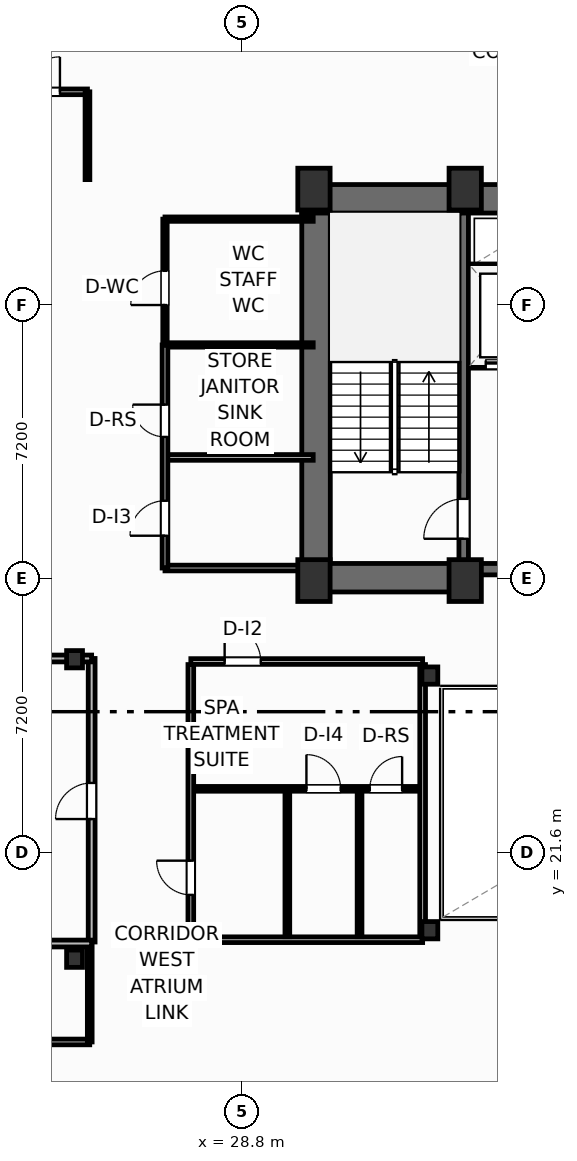
"""IFC4 building model, lengths in metres.
Left out: names, types, materials, properties, quantities, classifications, styles, units other than length and angle.
Written with IfcOpenShell. Run it as: python <this file> out.ifc"""

import sys

from ifc_helpers import new_model, si_unit, direction, frame, frame_2d, origin, origin_2d, place, context, subcontext, project, spatial, rectangle, i_section, extrude, element, fill, save


model = new_model("IFC4")
c1 = context("Model", 3, precision=1e-05, world=origin(), true_north=direction((0.0, 1.0)))
c2 = subcontext(c1, "Body", "Model", "MODEL_VIEW")
j1 = project(units=[si_unit("LENGTHUNIT", "METRE"), si_unit("PLANEANGLEUNIT", "RADIAN")], contexts=[c1])
p1 = place(None, origin())
s1 = spatial("IfcSite", under=j1, at=p1, CompositionType="ELEMENT")
p2 = place(p1, origin())
s2 = spatial("IfcBuilding", under=s1, at=p2, CompositionType="ELEMENT")
p3 = place(p2, frame((0.0, 0.0, 155.0)))
s3 = spatial("IfcBuildingStorey", under=s2, at=p3, CompositionType="ELEMENT", Elevation=155.0)
for number, where, z_axis, x_axis in (
    (1, (30.7, 28.75, 0.0), (0.0, 0.0, 1.0), (1.0, 0.0, 0.0)),
    (2, (34.68, 28.75, 0.0), (0.0, 0.0, 1.0), (1.0, 0.0, 0.0)),
    (3, (30.7, 39.05, 0.0), (0.0, 0.0, 1.0), (1.0, 0.0, 0.0)),
    (4, (34.68, 39.05, 0.0), (0.0, 0.0, 1.0), (1.0, 0.0, 0.0)),
):
    element("IfcColumn", number, at=place(p3, frame(where, z_axis=z_axis, x_axis=x_axis)), inside=s3, PredefinedType="COLUMN", context=c2, shape_type="SweptSolid", body=[
        extrude(rectangle(XDim=0.85, YDim=1.1, at=origin_2d()), origin(), (0.0, 0.0, 1.0), 3.7),
    ])
for number, where, z_axis, x_axis in (
    (5, (33.75, 19.55, 0.0), (0.0, 0.0, 1.0), (1.0, 0.0, 0.0)),
    (6, (33.75, 26.25, 0.0), (0.0, 0.0, 1.0), (1.0, 0.0, 0.0)),
    (7, (24.4, 18.8, 0.0), (0.0, 0.0, 1.0), (1.0, 0.0, 0.0)),
    (8, (24.4, 26.68, 0.0), (0.0, 0.0, 1.0), (1.0, 0.0, 0.0)),
):
    element("IfcColumn", number, at=place(p3, frame(where, z_axis=z_axis, x_axis=x_axis)), inside=s3, PredefinedType="COLUMN", context=c2, shape_type="SweptSolid", body=[
        extrude(i_section(OverallWidth=0.418, OverallDepth=0.455, WebThickness=0.042, FlangeThickness=0.068, FilletRadius=0.025, at=origin_2d()), origin(), (0.0, 0.0, 1.0), 3.7),
    ])
p4 = place(p3, frame((30.38, 38.795, 0.0), z_axis=(0.0, 0.0, 1.0), x_axis=(1.0, 0.0, 0.0)))
e9 = element("IfcWall", 9, at=p4, inside=s3, PredefinedType="SHEAR", context=c2, shape_type="SweptSolid", body=[
    extrude(rectangle(XDim=17.64, YDim=0.75, at=frame_2d((8.82, 0.0))), origin(), (0.0, 0.0, 1.0), 3.45),
])
p5 = place(p3, frame((30.755, 29.2, 0.0), z_axis=(0.0, 0.0, 1.0), x_axis=(0.0, 1.0, 0.0)))
e10 = element("IfcWall", 10, at=p5, inside=s3, PredefinedType="SHEAR", context=c2, shape_type="SweptSolid", body=[
    extrude(rectangle(XDim=9.22, YDim=0.75, at=frame_2d((4.61, 0.0))), origin(), (0.0, 0.0, 1.0), 3.45),
])
p6 = place(p3, frame((30.38, 28.825, 0.0), z_axis=(0.0, 0.0, 1.0), x_axis=(1.0, 0.0, 0.0)))
e11 = element("IfcWall", 11, at=p6, inside=s3, PredefinedType="SHEAR", context=c2, shape_type="SweptSolid", body=[
    extrude(rectangle(XDim=4.42, YDim=0.75, at=frame_2d((2.21, 0.0))), origin(), (0.0, 0.0, 1.0), 3.45),
])
p7 = place(p3, frame((34.8, 29.05, 0.0), z_axis=(0.0, 0.0, 1.0), x_axis=(1.0, 0.0, 0.0)))
e12 = element("IfcWall", 12, at=p7, inside=s3, PredefinedType="SHEAR", context=c2, shape_type="SweptSolid", body=[
    extrude(rectangle(XDim=8.8, YDim=0.3, at=frame_2d((4.4, 0.0))), origin(), (0.0, 0.0, 1.0), 3.45),
])
p8 = place(p7, frame((0.95, 0.0, 0.0)))
e13 = element("IfcOpeningElement", 13, at=p8, cuts=e12, PredefinedType="OPENING", context=c2, shape_type="SweptSolid", body=[
    extrude(rectangle(XDim=1.1, YDim=2.15, at=frame_2d((0.55, 1.075))), frame((0.0, 0.16, 0.0), z_axis=(0.0, -1.0, 0.0), x_axis=(1.0, 0.0, 0.0)), (0.0, 0.0, 1.0), 0.32),
])
p9 = place(p7, frame((6.75, 0.0, 0.0)))
e14 = element("IfcOpeningElement", 14, at=p9, cuts=e12, PredefinedType="OPENING", context=c2, shape_type="SweptSolid", body=[
    extrude(rectangle(XDim=1.1, YDim=2.15, at=frame_2d((0.55, 1.075))), frame((0.0, 0.16, 0.0), z_axis=(0.0, -1.0, 0.0), x_axis=(1.0, 0.0, 0.0)), (0.0, 0.0, 1.0), 0.32),
])
p10 = place(p7, frame((4.45, 0.0, 0.0)))
e15 = element("IfcOpeningElement", 15, at=p10, cuts=e12, PredefinedType="OPENING", context=c2, shape_type="SweptSolid", body=[
    extrude(rectangle(XDim=0.95, YDim=2.15, at=frame_2d((0.475, 1.075))), frame((0.0, 0.16, 0.0), z_axis=(0.0, -1.0, 0.0), x_axis=(1.0, 0.0, 0.0)), (0.0, 0.0, 1.0), 0.32),
])
p11 = place(p3, frame((34.64, 29.2, 0.0), z_axis=(0.0, 0.0, 1.0), x_axis=(0.0, 1.0, 0.0)))
e16 = element("IfcWall", 16, at=p11, inside=s3, PredefinedType="SHEAR", context=c2, shape_type="SweptSolid", body=[
    extrude(rectangle(XDim=9.22, YDim=0.25, at=frame_2d((4.61, 0.0))), origin(), (0.0, 0.0, 1.0), 3.45),
])
p12 = place(p11, frame((0.65, 0.0, 0.0)))
e17 = element("IfcOpeningElement", 17, at=p12, cuts=e16, PredefinedType="OPENING", context=c2, shape_type="SweptSolid", body=[
    extrude(rectangle(XDim=1.05, YDim=2.15, at=frame_2d((0.525, 1.075))), frame((0.0, 0.135, 0.0), z_axis=(0.0, -1.0, 0.0), x_axis=(1.0, 0.0, 0.0)), (0.0, 0.0, 1.0), 0.27),
])
p13 = place(p3, frame((5.0, 16.61, 0.0), z_axis=(0.0, 0.0, 1.0), x_axis=(1.0, 0.0, 0.0)))
e18 = element("IfcWall", 18, at=p13, inside=s3, PredefinedType="PARTITIONING", context=c2, shape_type="SweptSolid", body=[
    extrude(rectangle(XDim=19.8, YDim=0.15, at=frame_2d((9.9, 0.0))), origin(), (0.0, 0.0, 1.0), 3.45),
])
p14 = place(p13, frame((12.485, 0.0, 0.0)))
e19 = element("IfcOpeningElement", 19, at=p14, cuts=e18, PredefinedType="OPENING", context=c2, shape_type="SweptSolid", body=[
    extrude(rectangle(XDim=0.92, YDim=2.05, at=frame_2d((0.46, 1.025))), frame((0.0, 0.085, 0.0), z_axis=(0.0, -1.0, 0.0), x_axis=(1.0, 0.0, 0.0)), (0.0, 0.0, 1.0), 0.17),
])
p15 = place(p3, frame((24.8, 16.61, 0.0), z_axis=(0.0, 0.0, 1.0), x_axis=(0.0, 1.0, 0.0)))
e20 = element("IfcWall", 20, at=p15, inside=s3, PredefinedType="PARTITIONING", context=c2, shape_type="SweptSolid", body=[
    extrude(rectangle(XDim=2.63, YDim=0.125, at=frame_2d((1.315, 0.0))), origin(), (0.0, 0.0, 1.0), 2.662),
])
p16 = place(p3, frame((5.0, 41.61, 0.0), z_axis=(0.0, 0.0, 1.0), x_axis=(1.0, 0.0, 0.0)))
e21 = element("IfcWall", 21, at=p16, inside=s3, PredefinedType="PARTITIONING", context=c2, shape_type="SweptSolid", body=[
    extrude(rectangle(XDim=19.74, YDim=0.15, at=frame_2d((9.87, 0.0))), origin(), (0.0, 0.0, 1.0), 3.45),
])
p17 = place(p16, frame((18.096, 0.0, 0.0)))
e22 = element("IfcOpeningElement", 22, at=p17, cuts=e21, PredefinedType="OPENING", context=c2, shape_type="SweptSolid", body=[
    extrude(rectangle(XDim=0.92, YDim=2.05, at=frame_2d((0.46, 1.025))), frame((0.0, 0.085, 0.0), z_axis=(0.0, -1.0, 0.0), x_axis=(1.0, 0.0, 0.0)), (0.0, 0.0, 1.0), 0.17),
])
p18 = place(p3, frame((24.74, 39.3, 0.0), z_axis=(0.0, 0.0, 1.0), x_axis=(0.0, 1.0, 0.0)))
e23 = element("IfcWall", 23, at=p18, inside=s3, PredefinedType="PARTITIONING", context=c2, shape_type="SweptSolid", body=[
    extrude(rectangle(XDim=2.31, YDim=0.125, at=frame_2d((1.155, 0.0))), origin(), (0.0, 0.0, 1.0), 3.45),
])
p19 = place(p3, frame((24.85, 19.24, 0.0), z_axis=(0.0, 0.0, 1.0), x_axis=(0.0, 1.0, 0.0)))
e24 = element("IfcWall", 24, at=p19, inside=s3, PredefinedType="PARTITIONING", context=c2, shape_type="SweptSolid", body=[
    extrude(rectangle(XDim=7.46, YDim=0.18, at=frame_2d((3.73, 0.0))), origin(), (0.0, 0.0, 1.0), 3.45),
])
p20 = place(p19, frame((3.235, 0.0, 0.0)))
e25 = element("IfcOpeningElement", 25, at=p20, cuts=e24, PredefinedType="OPENING", context=c2, shape_type="SweptSolid", body=[
    extrude(rectangle(XDim=0.95, YDim=2.05, at=frame_2d((0.475, 1.025))), frame((0.0, 0.1, 0.0), z_axis=(0.0, -1.0, 0.0), x_axis=(1.0, 0.0, 0.0)), (0.0, 0.0, 1.0), 0.2),
])
p21 = place(p3, frame((1.169, 19.2, 0.0), z_axis=(0.0, 0.0, 1.0), x_axis=(1.0, 0.0, 0.0)))
e26 = element("IfcWall", 26, at=p21, inside=s3, PredefinedType="PARTITIONING", context=c2, shape_type="SweptSolid", body=[
    extrude(rectangle(XDim=23.681, YDim=0.18, at=frame_2d((11.84, 0.0))), origin(), (0.0, 0.0, 1.0), 3.45),
])
p22 = place(p3, frame((2.078, 26.7, 0.0), z_axis=(0.0, 0.0, 1.0), x_axis=(1.0, 0.0, 0.0)))
e27 = element("IfcWall", 27, at=p22, inside=s3, PredefinedType="PARTITIONING", context=c2, shape_type="SweptSolid", body=[
    extrude(rectangle(XDim=22.772, YDim=0.18, at=frame_2d((11.386, 0.0))), origin(), (0.0, 0.0, 1.0), 2.662),
])
p23 = place(p3, frame((34.8, 34.44, 0.0), z_axis=(0.0, 0.0, 1.0), x_axis=(1.0, 0.0, 0.0)))
e28 = element("IfcWall", 28, at=p23, inside=s3, PredefinedType="PARTITIONING", context=c2, shape_type="SweptSolid", body=[
    extrude(rectangle(XDim=2.18, YDim=0.2, at=frame_2d((1.09, 0.0))), origin(), (0.0, 0.0, 1.0), 3.45),
])
p24 = place(p23, frame((0.42, 0.0, 0.0)))
e29 = element("IfcOpeningElement", 29, at=p24, cuts=e28, PredefinedType="OPENING", context=c2, shape_type="SweptSolid", body=[
    extrude(rectangle(XDim=1.2, YDim=2.2, at=frame_2d((0.6, 1.1))), frame((0.0, 0.11, 0.0), z_axis=(0.0, -1.0, 0.0), x_axis=(1.0, 0.0, 0.0)), (0.0, 0.0, 1.0), 0.22),
])
p25 = place(p3, frame((34.8, 36.98, 0.0), z_axis=(0.0, 0.0, 1.0), x_axis=(1.0, 0.0, 0.0)))
e30 = element("IfcWall", 30, at=p25, inside=s3, PredefinedType="PARTITIONING", context=c2, shape_type="SweptSolid", body=[
    extrude(rectangle(XDim=2.18, YDim=0.2, at=frame_2d((1.09, 0.0))), origin(), (0.0, 0.0, 1.0), 3.45),
])
p26 = place(p3, frame((27.46, 26.62, 0.0), z_axis=(0.0, 0.0, 1.0), x_axis=(1.0, 0.0, 0.0)))
e31 = element("IfcWall", 31, at=p26, inside=s3, PredefinedType="PARTITIONING", context=c2, shape_type="SweptSolid", body=[
    extrude(rectangle(XDim=6.1, YDim=0.15, at=frame_2d((3.05, 0.0))), origin(), (0.0, 0.0, 1.0), 2.662),
])
p27 = place(p26, frame((0.89, 0.0, 0.0)))
e32 = element("IfcOpeningElement", 32, at=p27, cuts=e31, PredefinedType="OPENING", context=c2, shape_type="SweptSolid", body=[
    extrude(rectangle(XDim=0.95, YDim=2.05, at=frame_2d((0.475, 1.025))), frame((0.0, 0.085, 0.0), z_axis=(0.0, -1.0, 0.0), x_axis=(1.0, 0.0, 0.0)), (0.0, 0.0, 1.0), 0.17),
])
p28 = place(p3, frame((27.46, 19.3, 0.0), z_axis=(0.0, 0.0, 1.0), x_axis=(1.0, 0.0, 0.0)))
e33 = element("IfcWall", 33, at=p28, inside=s3, PredefinedType="PARTITIONING", context=c2, shape_type="SweptSolid", body=[
    extrude(rectangle(XDim=6.1, YDim=0.15, at=frame_2d((3.05, 0.0))), origin(), (0.0, 0.0, 1.0), 2.662),
])
p29 = place(p3, frame((27.52, 23.27, 0.0), z_axis=(0.0, 0.0, 1.0), x_axis=(1.0, 0.0, 0.0)))
e34 = element("IfcWall", 34, at=p29, inside=s3, PredefinedType="PARTITIONING", context=c2, shape_type="SweptSolid", body=[
    extrude(rectangle(XDim=6.0, YDim=0.125, at=frame_2d((3.0, 0.0))), origin(), (0.0, 0.0, 1.0), 3.45),
])
p30 = place(p29, frame((2.982, 0.0, 0.0)))
e35 = element("IfcOpeningElement", 35, at=p30, cuts=e34, PredefinedType="OPENING", context=c2, shape_type="SweptSolid", body=[
    extrude(rectangle(XDim=0.9, YDim=2.05, at=frame_2d((0.45, 1.025))), frame((0.0, 0.073, 0.0), z_axis=(0.0, -1.0, 0.0), x_axis=(1.0, 0.0, 0.0)), (0.0, 0.0, 1.0), 0.145),
])
p31 = place(p29, frame((4.65, 0.0, 0.0)))
e36 = element("IfcOpeningElement", 36, at=p31, cuts=e34, PredefinedType="OPENING", context=c2, shape_type="SweptSolid", body=[
    extrude(rectangle(XDim=0.85, YDim=2.05, at=frame_2d((0.425, 1.025))), frame((0.0, 0.073, 0.0), z_axis=(0.0, -1.0, 0.0), x_axis=(1.0, 0.0, 0.0)), (0.0, 0.0, 1.0), 0.145),
])
for number, where, z_axis, x_axis in (
    (37, (30.0, 19.38, 0.0), (0.0, 0.0, 1.0), (0.0, 1.0, 0.0)),
    (38, (31.9, 19.38, 0.0), (0.0, 0.0, 1.0), (0.0, 1.0, 0.0)),
):
    element("IfcWall", number, at=place(p3, frame(where, z_axis=z_axis, x_axis=x_axis)), inside=s3, PredefinedType="PARTITIONING", context=c2, shape_type="SweptSolid", body=[
        extrude(rectangle(XDim=3.82, YDim=0.125, at=frame_2d((1.91, 0.0))), origin(), (0.0, 0.0, 1.0), 3.45),
    ])
p32 = place(p3, frame((27.46, 19.38, 0.0), z_axis=(0.0, 0.0, 1.0), x_axis=(0.0, 1.0, 0.0)))
e39 = element("IfcWall", 39, at=p32, inside=s3, PredefinedType="PARTITIONING", context=c2, shape_type="SweptSolid", body=[
    extrude(rectangle(XDim=7.16, YDim=0.15, at=frame_2d((3.58, 0.0))), origin(), (0.0, 0.0, 1.0), 3.45),
])
p33 = place(p32, frame((1.1, 0.0, 0.0)))
e40 = element("IfcOpeningElement", 40, at=p33, cuts=e39, PredefinedType="OPENING", context=c2, shape_type="SweptSolid", body=[
    extrude(rectangle(XDim=0.9, YDim=2.05, at=frame_2d((0.45, 1.025))), frame((0.0, 0.085, 0.0), z_axis=(0.0, -1.0, 0.0), x_axis=(1.0, 0.0, 0.0)), (0.0, 0.0, 1.0), 0.17),
])
p34 = place(p3, frame((33.56, 19.38, 0.0), z_axis=(0.0, 0.0, 1.0), x_axis=(0.0, 1.0, 0.0)))
e41 = element("IfcWall", 41, at=p34, inside=s3, PredefinedType="PARTITIONING", context=c2, shape_type="SweptSolid", body=[
    extrude(rectangle(XDim=7.16, YDim=0.15, at=frame_2d((3.58, 0.0))), origin(), (0.0, 0.0, 1.0), 2.824),
])
p35 = place(p3, frame((26.78, 29.08, 0.0), z_axis=(0.0, 0.0, 1.0), x_axis=(1.0, 0.0, 0.0)))
e42 = element("IfcWall", 42, at=p35, inside=s3, PredefinedType="PARTITIONING", context=c2, shape_type="SweptSolid", body=[
    extrude(rectangle(XDim=3.6, YDim=0.15, at=frame_2d((1.8, 0.0))), origin(), (0.0, 0.0, 1.0), 3.45),
])
p36 = place(p3, frame((26.8, 31.99, 0.0), z_axis=(0.0, 0.0, 1.0), x_axis=(1.0, 0.0, 0.0)))
e43 = element("IfcWall", 43, at=p36, inside=s3, PredefinedType="PARTITIONING", context=c2, shape_type="SweptSolid", body=[
    extrude(rectangle(XDim=3.88, YDim=0.15, at=frame_2d((1.94, 0.0))), origin(), (0.0, 0.0, 1.0), 3.45),
])
p37 = place(p3, frame((26.8, 34.95, 0.0), z_axis=(0.0, 0.0, 1.0), x_axis=(1.0, 0.0, 0.0)))
e44 = element("IfcWall", 44, at=p37, inside=s3, PredefinedType="PARTITIONING", context=c2, shape_type="SweptSolid", body=[
    extrude(rectangle(XDim=3.88, YDim=0.115, at=frame_2d((1.94, 0.0))), origin(), (0.0, 0.0, 1.0), 3.45),
])
p38 = place(p3, frame((26.78, 38.26, 0.0), z_axis=(0.0, 0.0, 1.0), x_axis=(1.0, 0.0, 0.0)))
e45 = element("IfcWall", 45, at=p38, inside=s3, PredefinedType="PARTITIONING", context=c2, shape_type="SweptSolid", body=[
    extrude(rectangle(XDim=3.9, YDim=0.115, at=frame_2d((1.95, 0.0))), origin(), (0.0, 0.0, 1.0), 3.45),
])
p39 = place(p3, frame((26.78, 29.08, 0.0), z_axis=(0.0, 0.0, 1.0), x_axis=(0.0, 1.0, 0.0)))
e46 = element("IfcWall", 46, at=p39, inside=s3, PredefinedType="PARTITIONING", context=c2, shape_type="SweptSolid", body=[
    extrude(rectangle(XDim=5.87, YDim=0.15, at=frame_2d((2.935, 0.0))), origin(), (0.0, 0.0, 1.0), 3.45),
])
p40 = place(p39, frame((0.85, 0.0, 0.0)))
e47 = element("IfcOpeningElement", 47, at=p40, cuts=e46, PredefinedType="OPENING", context=c2, shape_type="SweptSolid", body=[
    extrude(rectangle(XDim=0.92, YDim=2.05, at=frame_2d((0.46, 1.025))), frame((0.0, 0.085, 0.0), z_axis=(0.0, -1.0, 0.0), x_axis=(1.0, 0.0, 0.0)), (0.0, 0.0, 1.0), 0.17),
])
p41 = place(p39, frame((3.45, 0.0, 0.0)))
e48 = element("IfcOpeningElement", 48, at=p41, cuts=e46, PredefinedType="OPENING", context=c2, shape_type="SweptSolid", body=[
    extrude(rectangle(XDim=0.85, YDim=2.05, at=frame_2d((0.425, 1.025))), frame((0.0, 0.085, 0.0), z_axis=(0.0, -1.0, 0.0), x_axis=(1.0, 0.0, 0.0)), (0.0, 0.0, 1.0), 0.17),
])
p42 = place(p3, frame((26.78, 34.95, 0.0), z_axis=(0.0, 0.0, 1.0), x_axis=(0.0, 1.0, 0.0)))
e49 = element("IfcWall", 49, at=p42, inside=s3, PredefinedType="PARTITIONING", context=c2, shape_type="SweptSolid", body=[
    extrude(rectangle(XDim=3.31, YDim=0.115, at=frame_2d((1.655, 0.0))), origin(), (0.0, 0.0, 1.0), 3.45),
])
p43 = place(p42, frame((1.05, 0.0, 0.0)))
e50 = element("IfcOpeningElement", 50, at=p43, cuts=e49, PredefinedType="OPENING", context=c2, shape_type="SweptSolid", body=[
    extrude(rectangle(XDim=0.9, YDim=2.05, at=frame_2d((0.45, 1.025))), frame((0.0, 0.067, 0.0), z_axis=(0.0, -1.0, 0.0), x_axis=(1.0, 0.0, 0.0)), (0.0, 0.0, 1.0), 0.135),
])
p44 = place(p17, origin())
e51 = element("IfcDoor", 51, at=p44, inside=s3, OperationType="SINGLE_SWING_RIGHT", PredefinedType="DOOR", context=c2, shape_type="SweptSolid", body=[
    extrude(rectangle(XDim=0.92, YDim=2.05, at=frame_2d((0.46, 1.025))), frame((0.0, 0.025, 0.0), z_axis=(0.0, -1.0, 0.0), x_axis=(1.0, 0.0, 0.0)), (0.0, 0.0, 1.0), 0.05),
])
fill(e22, e51)
p45 = place(p20, origin())
e52 = element("IfcDoor", 52, at=p45, inside=s3, OperationType="SINGLE_SWING_LEFT", PredefinedType="DOOR", context=c2, shape_type="SweptSolid", body=[
    extrude(rectangle(XDim=0.95, YDim=2.05, at=frame_2d((0.475, 1.025))), frame((0.0, 0.025, 0.0), z_axis=(0.0, -1.0, 0.0), x_axis=(1.0, 0.0, 0.0)), (0.0, 0.0, 1.0), 0.05),
])
fill(e25, e52)
p46 = place(p12, origin())
e53 = element("IfcDoor", 53, at=p46, inside=s3, OperationType="SINGLE_SWING_LEFT", PredefinedType="DOOR", context=c2, shape_type="SweptSolid", body=[
    extrude(rectangle(XDim=1.05, YDim=2.15, at=frame_2d((0.525, 1.075))), frame((0.0, 0.025, 0.0), z_axis=(0.0, -1.0, 0.0), x_axis=(1.0, 0.0, 0.0)), (0.0, 0.0, 1.0), 0.05),
])
fill(e17, e53)
p47 = place(p24, origin())
e54 = element("IfcDoor", 54, at=p47, inside=s3, OperationType="SLIDING_TO_LEFT", PredefinedType="DOOR", context=c2, shape_type="SweptSolid", body=[
    extrude(rectangle(XDim=1.2, YDim=2.2, at=frame_2d((0.6, 1.1))), frame((0.0, 0.025, 0.0), z_axis=(0.0, -1.0, 0.0), x_axis=(1.0, 0.0, 0.0)), (0.0, 0.0, 1.0), 0.05),
])
fill(e29, e54)
p48 = place(p27, origin())
e55 = element("IfcDoor", 55, at=p48, inside=s3, OperationType="SINGLE_SWING_LEFT", PredefinedType="DOOR", context=c2, shape_type="SweptSolid", body=[
    extrude(rectangle(XDim=0.95, YDim=2.05, at=frame_2d((0.475, 1.025))), frame((0.0, 0.025, 0.0), z_axis=(0.0, -1.0, 0.0), x_axis=(1.0, 0.0, 0.0)), (0.0, 0.0, 1.0), 0.05),
])
fill(e32, e55)
p49 = place(p30, origin())
e56 = element("IfcDoor", 56, at=p49, inside=s3, OperationType="SINGLE_SWING_LEFT", PredefinedType="DOOR", context=c2, shape_type="SweptSolid", body=[
    extrude(rectangle(XDim=0.9, YDim=2.05, at=frame_2d((0.45, 1.025))), frame((0.0, 0.025, 0.0), z_axis=(0.0, -1.0, 0.0), x_axis=(1.0, 0.0, 0.0)), (0.0, 0.0, 1.0), 0.05),
])
fill(e35, e56)
p50 = place(p31, origin())
e57 = element("IfcDoor", 57, at=p50, inside=s3, OperationType="SINGLE_SWING_RIGHT", PredefinedType="DOOR", context=c2, shape_type="SweptSolid", body=[
    extrude(rectangle(XDim=0.85, YDim=2.05, at=frame_2d((0.425, 1.025))), frame((0.0, 0.025, 0.0), z_axis=(0.0, -1.0, 0.0), x_axis=(1.0, 0.0, 0.0)), (0.0, 0.0, 1.0), 0.05),
])
fill(e36, e57)
p51 = place(p33, origin())
e58 = element("IfcDoor", 58, at=p51, inside=s3, OperationType="SINGLE_SWING_RIGHT", PredefinedType="DOOR", context=c2, shape_type="SweptSolid", body=[
    extrude(rectangle(XDim=0.9, YDim=2.05, at=frame_2d((0.45, 1.025))), frame((0.0, 0.025, 0.0), z_axis=(0.0, -1.0, 0.0), x_axis=(1.0, 0.0, 0.0)), (0.0, 0.0, 1.0), 0.05),
])
fill(e40, e58)
p52 = place(p40, origin())
e59 = element("IfcDoor", 59, at=p52, inside=s3, OperationType="SINGLE_SWING_LEFT", PredefinedType="DOOR", context=c2, shape_type="SweptSolid", body=[
    extrude(rectangle(XDim=0.92, YDim=2.05, at=frame_2d((0.46, 1.025))), frame((0.0, 0.025, 0.0), z_axis=(0.0, -1.0, 0.0), x_axis=(1.0, 0.0, 0.0)), (0.0, 0.0, 1.0), 0.05),
])
fill(e47, e59)
p53 = place(p41, origin())
e60 = element("IfcDoor", 60, at=p53, inside=s3, OperationType="SINGLE_SWING_RIGHT", PredefinedType="DOOR", context=c2, shape_type="SweptSolid", body=[
    extrude(rectangle(XDim=0.85, YDim=2.05, at=frame_2d((0.425, 1.025))), frame((0.0, 0.025, 0.0), z_axis=(0.0, -1.0, 0.0), x_axis=(1.0, 0.0, 0.0)), (0.0, 0.0, 1.0), 0.05),
])
fill(e48, e60)
p54 = place(p43, origin())
e61 = element("IfcDoor", 61, at=p54, inside=s3, OperationType="SINGLE_SWING_LEFT", PredefinedType="DOOR", context=c2, shape_type="SweptSolid", body=[
    extrude(rectangle(XDim=0.9, YDim=2.05, at=frame_2d((0.45, 1.025))), frame((0.0, 0.025, 0.0), z_axis=(0.0, -1.0, 0.0), x_axis=(1.0, 0.0, 0.0)), (0.0, 0.0, 1.0), 0.05),
])
fill(e50, e61)
save(model, sys.argv[1])
